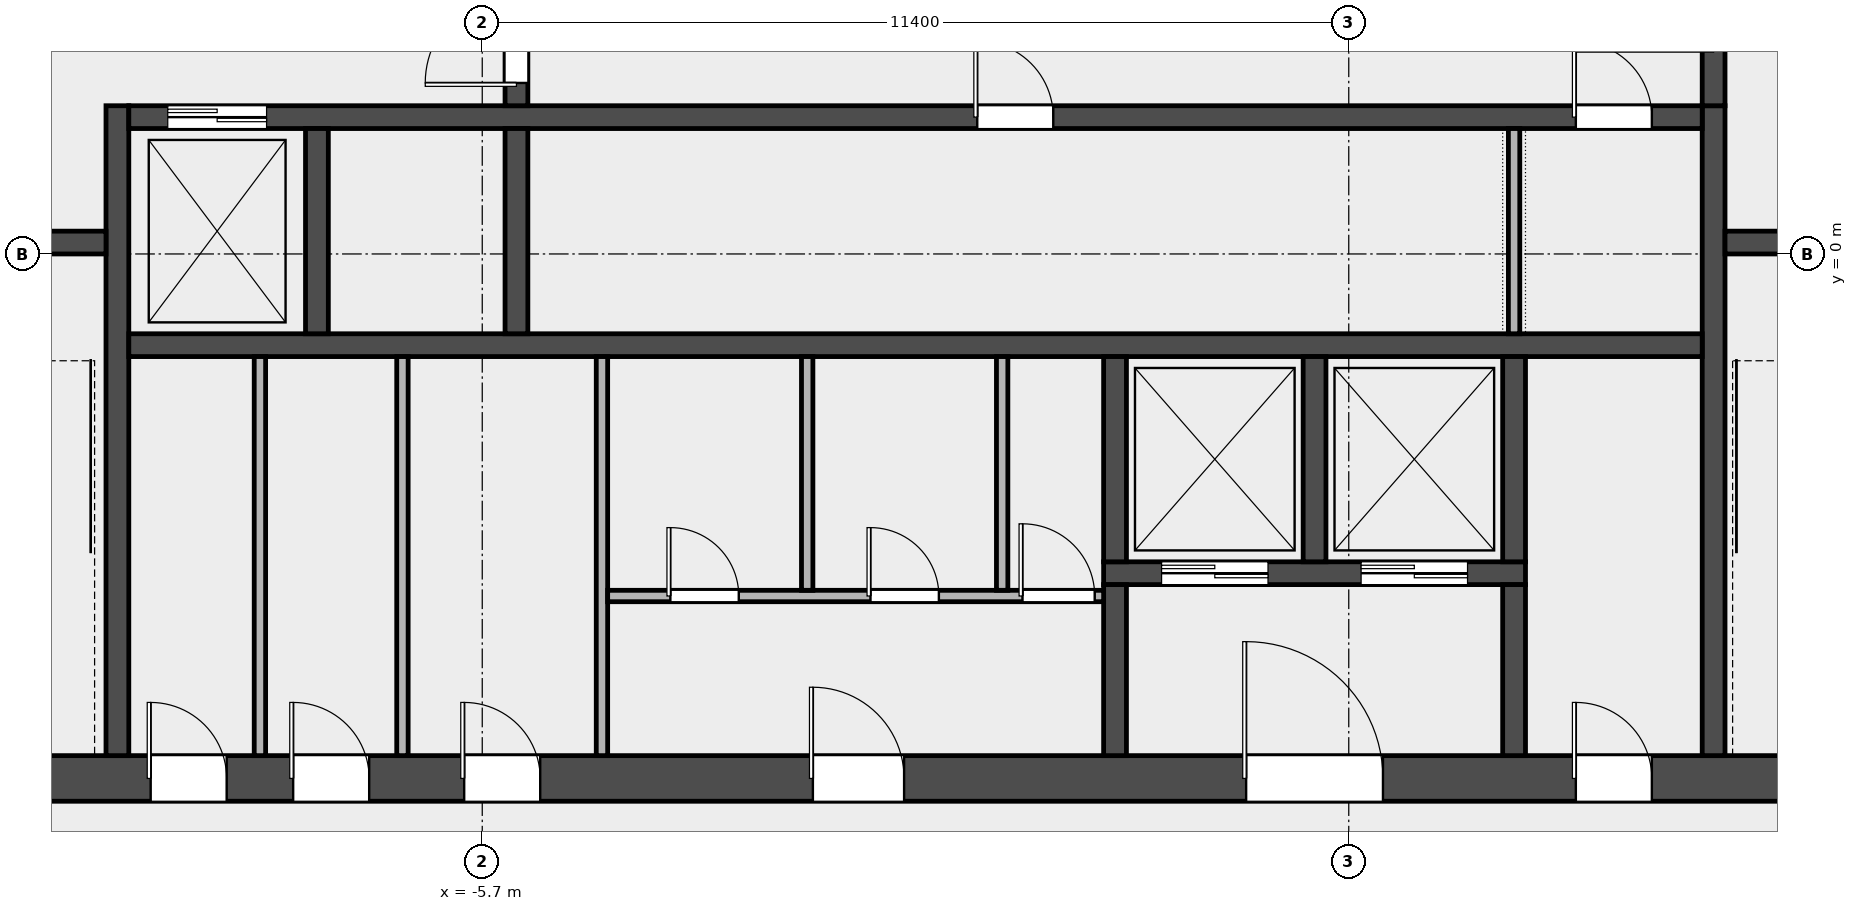
"""IFC4 building model, lengths in metres.
Left out: names, types, materials, properties, quantities, classifications, styles, units other than length and angle.
Written with IfcOpenShell. Run it as: python <this file> out.ifc"""

import sys

from ifc_helpers import new_model, si_unit, direction, frame, frame_2d, origin, place, context, subcontext, project, spatial, rectangle, extrude, element, fill, save


model = new_model("IFC4")
c1 = context("Model", 3, precision=1e-05, world=origin(), true_north=direction((0.0, 1.0)))
c2 = subcontext(c1, "Body", "Model", "MODEL_VIEW")
j1 = project(units=[si_unit("LENGTHUNIT", "METRE"), si_unit("PLANEANGLEUNIT", "RADIAN")], contexts=[c1])
p1 = place(None, origin())
s1 = spatial("IfcSite", under=j1, at=p1, CompositionType="ELEMENT")
p2 = place(p1, origin())
s2 = spatial("IfcBuilding", under=s1, at=p2, CompositionType="ELEMENT")
p3 = place(p2, frame((0.0, 0.0, 315.4)))
s3 = spatial("IfcBuildingStorey", under=s2, at=p3, CompositionType="ELEMENT", Elevation=315.4)
p4 = place(p3, frame((-14.4, -6.9, 0.0), z_axis=(0.0, 0.0, 1.0), x_axis=(1.0, 0.0, 0.0)))
e1 = element("IfcWall", 1, at=p4, inside=s3, PredefinedType="SHEAR", context=c2, shape_type="SweptSolid", body=[
    extrude(rectangle(XDim=28.8, YDim=0.6, at=frame_2d((14.4, 0.0))), origin(), (0.0, 0.0, 1.0), 5.7),
])
p5 = place(p4, frame((4.337, 0.0, 0.0)))
e2 = element("IfcOpeningElement", 2, at=p5, cuts=e1, PredefinedType="OPENING", context=c2, shape_type="SweptSolid", body=[
    extrude(rectangle(XDim=1.0, YDim=2.1, at=frame_2d((0.5, 1.05))), frame((0.0, 0.312, 0.0), z_axis=(0.0, -1.0, 0.0), x_axis=(1.0, 0.0, 0.0)), (0.0, 0.0, 1.0), 0.624),
])
p6 = place(p4, frame((6.212, 0.0, 0.0)))
e3 = element("IfcOpeningElement", 3, at=p6, cuts=e1, PredefinedType="OPENING", context=c2, shape_type="SweptSolid", body=[
    extrude(rectangle(XDim=1.0, YDim=2.1, at=frame_2d((0.5, 1.05))), frame((0.0, 0.312, 0.0), z_axis=(0.0, -1.0, 0.0), x_axis=(1.0, 0.0, 0.0)), (0.0, 0.0, 1.0), 0.624),
])
p7 = place(p4, frame((8.462, 0.0, 0.0)))
e4 = element("IfcOpeningElement", 4, at=p7, cuts=e1, PredefinedType="OPENING", context=c2, shape_type="SweptSolid", body=[
    extrude(rectangle(XDim=1.0, YDim=2.1, at=frame_2d((0.5, 1.05))), frame((0.0, 0.312, 0.0), z_axis=(0.0, -1.0, 0.0), x_axis=(1.0, 0.0, 0.0)), (0.0, 0.0, 1.0), 0.624),
])
p8 = place(p4, frame((13.05, 0.0, 0.0)))
e5 = element("IfcOpeningElement", 5, at=p8, cuts=e1, PredefinedType="OPENING", context=c2, shape_type="SweptSolid", body=[
    extrude(rectangle(XDim=1.2, YDim=2.1, at=frame_2d((0.6, 1.05))), frame((0.0, 0.312, 0.0), z_axis=(0.0, -1.0, 0.0), x_axis=(1.0, 0.0, 0.0)), (0.0, 0.0, 1.0), 0.624),
])
p9 = place(p4, frame((18.75, 0.0, 0.0)))
e6 = element("IfcOpeningElement", 6, at=p9, cuts=e1, PredefinedType="OPENING", context=c2, shape_type="SweptSolid", body=[
    extrude(rectangle(XDim=1.8, YDim=2.1, at=frame_2d((0.9, 1.05))), frame((0.0, 0.312, 0.0), z_axis=(0.0, -1.0, 0.0), x_axis=(1.0, 0.0, 0.0)), (0.0, 0.0, 1.0), 0.624),
])
p10 = place(p4, frame((23.087, 0.0, 0.0)))
e7 = element("IfcOpeningElement", 7, at=p10, cuts=e1, PredefinedType="OPENING", context=c2, shape_type="SweptSolid", body=[
    extrude(rectangle(XDim=1.0, YDim=2.1, at=frame_2d((0.5, 1.05))), frame((0.0, 0.312, 0.0), z_axis=(0.0, -1.0, 0.0), x_axis=(1.0, 0.0, 0.0)), (0.0, 0.0, 1.0), 0.624),
])
for number, where, z_axis, x_axis in (
    (8, (-10.5, -6.6, 0.0), (0.0, 0.0, 1.0), (0.0, 1.0, 0.0)),
    (9, (10.5, -6.6, 0.0), (0.0, 0.0, 1.0), (0.0, 1.0, 0.0)),
):
    element("IfcWall", number, at=place(p3, frame(where, z_axis=z_axis, x_axis=x_axis)), inside=s3, PredefinedType="SHEAR", context=c2, shape_type="SweptSolid", body=[
        extrude(rectangle(XDim=8.55, YDim=0.3, at=frame_2d((4.275, 0.0))), origin(), (0.0, 0.0, 1.0), 5.7),
    ])
p11 = place(p3, frame((-13.8, 0.15, 0.0), z_axis=(0.0, 0.0, 1.0), x_axis=(1.0, 0.0, 0.0)))
e10 = element("IfcWall", 10, at=p11, inside=s3, PredefinedType="SOLIDWALL", context=c2, shape_type="SweptSolid", body=[
    extrude(rectangle(XDim=3.15, YDim=0.3, at=frame_2d((1.575, 0.0))), origin(), (0.0, 0.0, 1.0), 5.7),
])
p12 = place(p11, frame((0.975, 0.0, 0.0)))
e11 = element("IfcOpeningElement", 11, at=p12, cuts=e10, PredefinedType="OPENING", context=c2, shape_type="SweptSolid", body=[
    extrude(rectangle(XDim=1.1, YDim=2.1, at=frame_2d((0.55, 1.05))), frame((0.0, 0.162, 0.0), z_axis=(0.0, -1.0, 0.0), x_axis=(1.0, 0.0, 0.0)), (0.0, 0.0, 1.0), 0.324),
])
p13 = place(p3, frame((10.65, 0.15, 0.0), z_axis=(0.0, 0.0, 1.0), x_axis=(1.0, 0.0, 0.0)))
e12 = element("IfcWall", 12, at=p13, inside=s3, PredefinedType="SOLIDWALL", context=c2, shape_type="SweptSolid", body=[
    extrude(rectangle(XDim=3.15, YDim=0.3, at=frame_2d((1.575, 0.0))), origin(), (0.0, 0.0, 1.0), 5.7),
])
p14 = place(p13, frame((1.025, 0.0, 0.0)))
e13 = element("IfcOpeningElement", 13, at=p14, cuts=e12, PredefinedType="OPENING", context=c2, shape_type="SweptSolid", body=[
    extrude(rectangle(XDim=1.1, YDim=2.1, at=frame_2d((0.55, 1.05))), frame((0.0, 0.162, 0.0), z_axis=(0.0, -1.0, 0.0), x_axis=(1.0, 0.0, 0.0)), (0.0, 0.0, 1.0), 0.324),
])
p15 = place(p3, frame((-10.35, -1.2, 0.0), z_axis=(0.0, 0.0, 1.0), x_axis=(1.0, 0.0, 0.0)))
e14 = element("IfcWall", 14, at=p15, inside=s3, PredefinedType="SOLIDWALL", context=c2, shape_type="SweptSolid", body=[
    extrude(rectangle(XDim=20.7, YDim=0.3, at=frame_2d((10.35, 0.0))), origin(), (0.0, 0.0, 1.0), 5.7),
])
p16 = place(p3, frame((-10.35, 1.8, 0.0), z_axis=(0.0, 0.0, 1.0), x_axis=(1.0, 0.0, 0.0)))
e15 = element("IfcWall", 15, at=p16, inside=s3, PredefinedType="SOLIDWALL", context=c2, shape_type="SweptSolid", body=[
    extrude(rectangle(XDim=20.7, YDim=0.3, at=frame_2d((10.35, 0.0))), origin(), (0.0, 0.0, 1.0), 5.7),
])
p17 = place(p16, frame((0.512, 0.0, 0.0)))
e16 = element("IfcOpeningElement", 16, at=p17, cuts=e15, PredefinedType="OPENING", context=c2, shape_type="SweptSolid", body=[
    extrude(rectangle(XDim=1.3, YDim=2.1, at=frame_2d((0.65, 1.05))), frame((0.0, 0.162, 0.0), z_axis=(0.0, -1.0, 0.0), x_axis=(1.0, 0.0, 0.0)), (0.0, 0.0, 1.0), 0.324),
])
p18 = place(p16, frame((11.163, 0.0, 0.0)))
e17 = element("IfcOpeningElement", 17, at=p18, cuts=e15, PredefinedType="OPENING", context=c2, shape_type="SweptSolid", body=[
    extrude(rectangle(XDim=1.0, YDim=2.1, at=frame_2d((0.5, 1.05))), frame((0.0, 0.162, 0.0), z_axis=(0.0, -1.0, 0.0), x_axis=(1.0, 0.0, 0.0)), (0.0, 0.0, 1.0), 0.324),
])
p19 = place(p16, frame((19.038, 0.0, 0.0)))
e18 = element("IfcOpeningElement", 18, at=p19, cuts=e15, PredefinedType="OPENING", context=c2, shape_type="SweptSolid", body=[
    extrude(rectangle(XDim=1.0, YDim=2.1, at=frame_2d((0.5, 1.05))), frame((0.0, 0.162, 0.0), z_axis=(0.0, -1.0, 0.0), x_axis=(1.0, 0.0, 0.0)), (0.0, 0.0, 1.0), 0.324),
])
for number, where, z_axis, x_axis in (
    (19, (-7.875, -1.05, 0.0), (0.0, 0.0, 1.0), (0.0, 1.0, 0.0)),
    (20, (-5.25, -1.05, 0.0), (0.0, 0.0, 1.0), (0.0, 1.0, 0.0)),
):
    element("IfcWall", number, at=place(p3, frame(where, z_axis=z_axis, x_axis=x_axis)), inside=s3, PredefinedType="SOLIDWALL", context=c2, shape_type="SweptSolid", body=[
        extrude(rectangle(XDim=2.7, YDim=0.3, at=frame_2d((1.35, 0.0))), origin(), (0.0, 0.0, 1.0), 5.7),
    ])
p20 = place(p3, frame((-5.25, 1.95, 0.0), z_axis=(0.0, 0.0, 1.0), x_axis=(0.0, 1.0, 0.0)))
e21 = element("IfcWall", 21, at=p20, inside=s3, PredefinedType="SOLIDWALL", context=c2, shape_type="SweptSolid", body=[
    extrude(rectangle(XDim=3.3, YDim=0.3, at=frame_2d((1.65, 0.0))), origin(), (0.0, 0.0, 1.0), 5.7),
])
p21 = place(p20, frame((0.3, 0.0, 0.0)))
e22 = element("IfcOpeningElement", 22, at=p21, cuts=e21, PredefinedType="OPENING", context=c2, shape_type="SweptSolid", body=[
    extrude(rectangle(XDim=1.2, YDim=2.1, at=frame_2d((0.6, 1.05))), frame((0.0, 0.162, 0.0), z_axis=(0.0, -1.0, 0.0), x_axis=(1.0, 0.0, 0.0)), (0.0, 0.0, 1.0), 0.324),
])
p22 = place(p20, frame((1.8, 0.0, 0.0)))
e23 = element("IfcOpeningElement", 23, at=p22, cuts=e21, PredefinedType="OPENING", context=c2, shape_type="SweptSolid", body=[
    extrude(rectangle(XDim=1.2, YDim=2.1, at=frame_2d((0.6, 1.05))), frame((0.0, 0.162, 0.0), z_axis=(0.0, -1.0, 0.0), x_axis=(1.0, 0.0, 0.0)), (0.0, 0.0, 1.0), 0.324),
])
p23 = place(p3, frame((2.475, -4.2, 0.0), z_axis=(0.0, 0.0, 1.0), x_axis=(1.0, 0.0, 0.0)))
e24 = element("IfcWall", 24, at=p23, inside=s3, PredefinedType="SOLIDWALL", context=c2, shape_type="SweptSolid", body=[
    extrude(rectangle(XDim=5.55, YDim=0.3, at=frame_2d((2.775, 0.0))), origin(), (0.0, 0.0, 1.0), 5.7),
])
p24 = place(p23, frame((0.762, 0.0, 0.0)))
e25 = element("IfcOpeningElement", 25, at=p24, cuts=e24, PredefinedType="OPENING", context=c2, shape_type="SweptSolid", body=[
    extrude(rectangle(XDim=1.4, YDim=2.1, at=frame_2d((0.7, 1.05))), frame((0.0, 0.162, 0.0), z_axis=(0.0, -1.0, 0.0), x_axis=(1.0, 0.0, 0.0)), (0.0, 0.0, 1.0), 0.324),
])
p25 = place(p23, frame((3.387, 0.0, 0.0)))
e26 = element("IfcOpeningElement", 26, at=p25, cuts=e24, PredefinedType="OPENING", context=c2, shape_type="SweptSolid", body=[
    extrude(rectangle(XDim=1.4, YDim=2.1, at=frame_2d((0.7, 1.05))), frame((0.0, 0.162, 0.0), z_axis=(0.0, -1.0, 0.0), x_axis=(1.0, 0.0, 0.0)), (0.0, 0.0, 1.0), 0.324),
])
p26 = place(p3, frame((2.625, -4.05, 0.0), z_axis=(0.0, 0.0, 1.0), x_axis=(0.0, 1.0, 0.0)))
e27 = element("IfcWall", 27, at=p26, inside=s3, PredefinedType="SOLIDWALL", context=c2, shape_type="SweptSolid", body=[
    extrude(rectangle(XDim=2.7, YDim=0.3, at=frame_2d((1.35, 0.0))), origin(), (0.0, 0.0, 1.0), 5.7),
])
p27 = place(p3, frame((2.625, -6.6, 0.0), z_axis=(0.0, 0.0, 1.0), x_axis=(0.0, 1.0, 0.0)))
e28 = element("IfcWall", 28, at=p27, inside=s3, PredefinedType="SOLIDWALL", context=c2, shape_type="SweptSolid", body=[
    extrude(rectangle(XDim=2.25, YDim=0.3, at=frame_2d((1.125, 0.0))), origin(), (0.0, 0.0, 1.0), 5.7),
])
for number, where, z_axis, x_axis in (
    (29, (5.25, -4.05, 0.0), (0.0, 0.0, 1.0), (0.0, 1.0, 0.0)),
    (30, (7.875, -4.05, 0.0), (0.0, 0.0, 1.0), (0.0, 1.0, 0.0)),
):
    element("IfcWall", number, at=place(p3, frame(where, z_axis=z_axis, x_axis=x_axis)), inside=s3, PredefinedType="SOLIDWALL", context=c2, shape_type="SweptSolid", body=[
        extrude(rectangle(XDim=2.7, YDim=0.3, at=frame_2d((1.35, 0.0))), origin(), (0.0, 0.0, 1.0), 5.7),
    ])
p28 = place(p3, frame((7.875, -6.6, 0.0), z_axis=(0.0, 0.0, 1.0), x_axis=(0.0, 1.0, 0.0)))
e31 = element("IfcWall", 31, at=p28, inside=s3, PredefinedType="SOLIDWALL", context=c2, shape_type="SweptSolid", body=[
    extrude(rectangle(XDim=2.25, YDim=0.3, at=frame_2d((1.125, 0.0))), origin(), (0.0, 0.0, 1.0), 5.7),
])
for number, where, z_axis, x_axis in (
    (32, (-8.625, -6.6, 0.0), (0.0, 0.0, 1.0), (0.0, 1.0, 0.0)),
    (33, (-6.75, -6.6, 0.0), (0.0, 0.0, 1.0), (0.0, 1.0, 0.0)),
    (34, (-4.125, -6.6, 0.0), (0.0, 0.0, 1.0), (0.0, 1.0, 0.0)),
):
    element("IfcWall", number, at=place(p3, frame(where, z_axis=z_axis, x_axis=x_axis)), inside=s3, PredefinedType="PARTITIONING", context=c2, shape_type="SweptSolid", body=[
        extrude(rectangle(XDim=5.25, YDim=0.15, at=frame_2d((2.625, 0.0))), origin(), (0.0, 0.0, 1.0), 5.7),
    ])
p29 = place(p3, frame((-4.05, -4.5, 0.0), z_axis=(0.0, 0.0, 1.0), x_axis=(1.0, 0.0, 0.0)))
e35 = element("IfcWall", 35, at=p29, inside=s3, PredefinedType="PARTITIONING", context=c2, shape_type="SweptSolid", body=[
    extrude(rectangle(XDim=6.525, YDim=0.15, at=frame_2d((3.263, 0.0))), origin(), (0.0, 0.0, 1.0), 5.7),
])
p30 = place(p29, frame((0.825, 0.0, 0.0)))
e36 = element("IfcOpeningElement", 36, at=p30, cuts=e35, PredefinedType="OPENING", context=c2, shape_type="SweptSolid", body=[
    extrude(rectangle(XDim=0.9, YDim=2.1, at=frame_2d((0.45, 1.05))), frame((0.0, 0.087, 0.0), z_axis=(0.0, -1.0, 0.0), x_axis=(1.0, 0.0, 0.0)), (0.0, 0.0, 1.0), 0.174),
])
p31 = place(p29, frame((3.458, 0.0, 0.0)))
e37 = element("IfcOpeningElement", 37, at=p31, cuts=e35, PredefinedType="OPENING", context=c2, shape_type="SweptSolid", body=[
    extrude(rectangle(XDim=0.9, YDim=2.1, at=frame_2d((0.45, 1.05))), frame((0.0, 0.087, 0.0), z_axis=(0.0, -1.0, 0.0), x_axis=(1.0, 0.0, 0.0)), (0.0, 0.0, 1.0), 0.174),
])
p32 = place(p29, frame((5.458, 0.0, 0.0)))
e38 = element("IfcOpeningElement", 38, at=p32, cuts=e35, PredefinedType="OPENING", context=c2, shape_type="SweptSolid", body=[
    extrude(rectangle(XDim=0.95, YDim=2.1, at=frame_2d((0.475, 1.05))), frame((0.0, 0.087, 0.0), z_axis=(0.0, -1.0, 0.0), x_axis=(1.0, 0.0, 0.0)), (0.0, 0.0, 1.0), 0.174),
])
for number, where, z_axis, x_axis in (
    (39, (-1.425, -4.425, 0.0), (0.0, 0.0, 1.0), (0.0, 1.0, 0.0)),
    (40, (1.14, -4.425, 0.0), (0.0, 0.0, 1.0), (0.0, 1.0, 0.0)),
):
    element("IfcWall", number, at=place(p3, frame(where, z_axis=z_axis, x_axis=x_axis)), inside=s3, PredefinedType="PARTITIONING", context=c2, shape_type="SweptSolid", body=[
        extrude(rectangle(XDim=3.075, YDim=0.15, at=frame_2d((1.538, 0.0))), origin(), (0.0, 0.0, 1.0), 5.7),
    ])
p33 = place(p3, frame((7.875, -1.05, 0.0), z_axis=(0.0, 0.0, 1.0), x_axis=(0.0, 1.0, 0.0)))
e41 = element("IfcWall", 41, at=p33, inside=s3, PredefinedType="PARTITIONING", context=c2, shape_type="SweptSolid", body=[
    extrude(rectangle(XDim=2.7, YDim=0.15, at=frame_2d((1.35, 0.0))), origin(), (0.0, 0.0, 1.0), 5.7),
])
p34 = place(p3, frame((10.5, 1.95, 0.0), z_axis=(0.0, 0.0, 1.0), x_axis=(0.0, 1.0, 0.0)))
e42 = element("IfcWall", 42, at=p34, inside=s3, PredefinedType="SOLIDWALL", context=c2, shape_type="SweptSolid", body=[
    extrude(rectangle(XDim=3.3, YDim=0.3, at=frame_2d((1.65, 0.0))), origin(), (0.0, 0.0, 1.0), 5.7),
])
p35 = place(p34, frame((0.75, 0.0, 0.0)))
e43 = element("IfcOpeningElement", 43, at=p35, cuts=e42, PredefinedType="OPENING", context=c2, shape_type="SweptSolid", body=[
    extrude(rectangle(XDim=1.8, YDim=2.1, at=frame_2d((0.9, 1.05))), frame((0.0, 0.162, 0.0), z_axis=(0.0, -1.0, 0.0), x_axis=(1.0, 0.0, 0.0)), (0.0, 0.0, 1.0), 0.324),
])
p36 = place(p21, origin())
e44 = element("IfcDoor", 44, at=p36, inside=s3, OperationType="SINGLE_SWING_LEFT", PredefinedType="DOOR", context=c2, shape_type="SweptSolid", body=[
    extrude(rectangle(XDim=1.2, YDim=2.1, at=frame_2d((0.6, 1.05))), frame((0.0, 0.025, 0.0), z_axis=(0.0, -1.0, 0.0), x_axis=(1.0, 0.0, 0.0)), (0.0, 0.0, 1.0), 0.05),
])
fill(e22, e44)
p37 = place(p17, origin())
e45 = element("IfcDoor", 45, at=p37, inside=s3, OperationType="DOUBLE_DOOR_SLIDING", PredefinedType="DOOR", context=c2, shape_type="SweptSolid", body=[
    extrude(rectangle(XDim=1.3, YDim=2.1, at=frame_2d((0.65, 1.05))), frame((0.0, 0.025, 0.0), z_axis=(0.0, -1.0, 0.0), x_axis=(1.0, 0.0, 0.0)), (0.0, 0.0, 1.0), 0.05),
])
fill(e16, e45)
p38 = place(p24, origin())
e46 = element("IfcDoor", 46, at=p38, inside=s3, OperationType="DOUBLE_DOOR_SLIDING", PredefinedType="DOOR", context=c2, shape_type="SweptSolid", body=[
    extrude(rectangle(XDim=1.4, YDim=2.1, at=frame_2d((0.7, 1.05))), frame((0.0, 0.025, 0.0), z_axis=(0.0, -1.0, 0.0), x_axis=(1.0, 0.0, 0.0)), (0.0, 0.0, 1.0), 0.05),
])
fill(e25, e46)
p39 = place(p25, origin())
e47 = element("IfcDoor", 47, at=p39, inside=s3, OperationType="DOUBLE_DOOR_SLIDING", PredefinedType="DOOR", context=c2, shape_type="SweptSolid", body=[
    extrude(rectangle(XDim=1.4, YDim=2.1, at=frame_2d((0.7, 1.05))), frame((0.0, 0.025, 0.0), z_axis=(0.0, -1.0, 0.0), x_axis=(1.0, 0.0, 0.0)), (0.0, 0.0, 1.0), 0.05),
])
fill(e26, e47)
p40 = place(p5, origin())
e48 = element("IfcDoor", 48, at=p40, inside=s3, OperationType="SINGLE_SWING_LEFT", PredefinedType="DOOR", context=c2, shape_type="SweptSolid", body=[
    extrude(rectangle(XDim=1.0, YDim=2.1, at=frame_2d((0.5, 1.05))), frame((0.0, 0.025, 0.0), z_axis=(0.0, -1.0, 0.0), x_axis=(1.0, 0.0, 0.0)), (0.0, 0.0, 1.0), 0.05),
])
fill(e2, e48)
p41 = place(p6, origin())
e49 = element("IfcDoor", 49, at=p41, inside=s3, OperationType="SINGLE_SWING_LEFT", PredefinedType="DOOR", context=c2, shape_type="SweptSolid", body=[
    extrude(rectangle(XDim=1.0, YDim=2.1, at=frame_2d((0.5, 1.05))), frame((0.0, 0.025, 0.0), z_axis=(0.0, -1.0, 0.0), x_axis=(1.0, 0.0, 0.0)), (0.0, 0.0, 1.0), 0.05),
])
fill(e3, e49)
p42 = place(p7, origin())
e50 = element("IfcDoor", 50, at=p42, inside=s3, OperationType="SINGLE_SWING_LEFT", PredefinedType="DOOR", context=c2, shape_type="SweptSolid", body=[
    extrude(rectangle(XDim=1.0, YDim=2.1, at=frame_2d((0.5, 1.05))), frame((0.0, 0.025, 0.0), z_axis=(0.0, -1.0, 0.0), x_axis=(1.0, 0.0, 0.0)), (0.0, 0.0, 1.0), 0.05),
])
fill(e4, e50)
p43 = place(p8, origin())
e51 = element("IfcDoor", 51, at=p43, inside=s3, OperationType="SINGLE_SWING_LEFT", PredefinedType="DOOR", context=c2, shape_type="SweptSolid", body=[
    extrude(rectangle(XDim=1.2, YDim=2.1, at=frame_2d((0.6, 1.05))), frame((0.0, 0.025, 0.0), z_axis=(0.0, -1.0, 0.0), x_axis=(1.0, 0.0, 0.0)), (0.0, 0.0, 1.0), 0.05),
])
fill(e5, e51)
p44 = place(p30, origin())
e52 = element("IfcDoor", 52, at=p44, inside=s3, OperationType="SINGLE_SWING_LEFT", PredefinedType="DOOR", context=c2, shape_type="SweptSolid", body=[
    extrude(rectangle(XDim=0.9, YDim=2.1, at=frame_2d((0.45, 1.05))), frame((0.0, 0.025, 0.0), z_axis=(0.0, -1.0, 0.0), x_axis=(1.0, 0.0, 0.0)), (0.0, 0.0, 1.0), 0.05),
])
fill(e36, e52)
p45 = place(p31, origin())
e53 = element("IfcDoor", 53, at=p45, inside=s3, OperationType="SINGLE_SWING_LEFT", PredefinedType="DOOR", context=c2, shape_type="SweptSolid", body=[
    extrude(rectangle(XDim=0.9, YDim=2.1, at=frame_2d((0.45, 1.05))), frame((0.0, 0.025, 0.0), z_axis=(0.0, -1.0, 0.0), x_axis=(1.0, 0.0, 0.0)), (0.0, 0.0, 1.0), 0.05),
])
fill(e37, e53)
p46 = place(p32, origin())
e54 = element("IfcDoor", 54, at=p46, inside=s3, OperationType="SINGLE_SWING_LEFT", PredefinedType="DOOR", context=c2, shape_type="SweptSolid", body=[
    extrude(rectangle(XDim=0.95, YDim=2.1, at=frame_2d((0.475, 1.05))), frame((0.0, 0.025, 0.0), z_axis=(0.0, -1.0, 0.0), x_axis=(1.0, 0.0, 0.0)), (0.0, 0.0, 1.0), 0.05),
])
fill(e38, e54)
p47 = place(p9, origin())
e55 = element("IfcDoor", 55, at=p47, inside=s3, OperationType="DOUBLE_DOOR_SINGLE_SWING", PredefinedType="DOOR", context=c2, shape_type="SweptSolid", body=[
    extrude(rectangle(XDim=1.8, YDim=2.1, at=frame_2d((0.9, 1.05))), frame((0.0, 0.025, 0.0), z_axis=(0.0, -1.0, 0.0), x_axis=(1.0, 0.0, 0.0)), (0.0, 0.0, 1.0), 0.05),
])
fill(e6, e55)
p48 = place(p10, origin())
e56 = element("IfcDoor", 56, at=p48, inside=s3, OperationType="SINGLE_SWING_LEFT", PredefinedType="DOOR", context=c2, shape_type="SweptSolid", body=[
    extrude(rectangle(XDim=1.0, YDim=2.1, at=frame_2d((0.5, 1.05))), frame((0.0, 0.025, 0.0), z_axis=(0.0, -1.0, 0.0), x_axis=(1.0, 0.0, 0.0)), (0.0, 0.0, 1.0), 0.05),
])
fill(e7, e56)
p49 = place(p18, origin())
e57 = element("IfcDoor", 57, at=p49, inside=s3, OperationType="SINGLE_SWING_LEFT", PredefinedType="DOOR", context=c2, shape_type="SweptSolid", body=[
    extrude(rectangle(XDim=1.0, YDim=2.1, at=frame_2d((0.5, 1.05))), frame((0.0, 0.025, 0.0), z_axis=(0.0, -1.0, 0.0), x_axis=(1.0, 0.0, 0.0)), (0.0, 0.0, 1.0), 0.05),
])
fill(e17, e57)
p50 = place(p19, origin())
e58 = element("IfcDoor", 58, at=p50, inside=s3, OperationType="SINGLE_SWING_LEFT", PredefinedType="DOOR", context=c2, shape_type="SweptSolid", body=[
    extrude(rectangle(XDim=1.0, YDim=2.1, at=frame_2d((0.5, 1.05))), frame((0.0, 0.025, 0.0), z_axis=(0.0, -1.0, 0.0), x_axis=(1.0, 0.0, 0.0)), (0.0, 0.0, 1.0), 0.05),
])
fill(e18, e58)
save(model, sys.argv[1])
